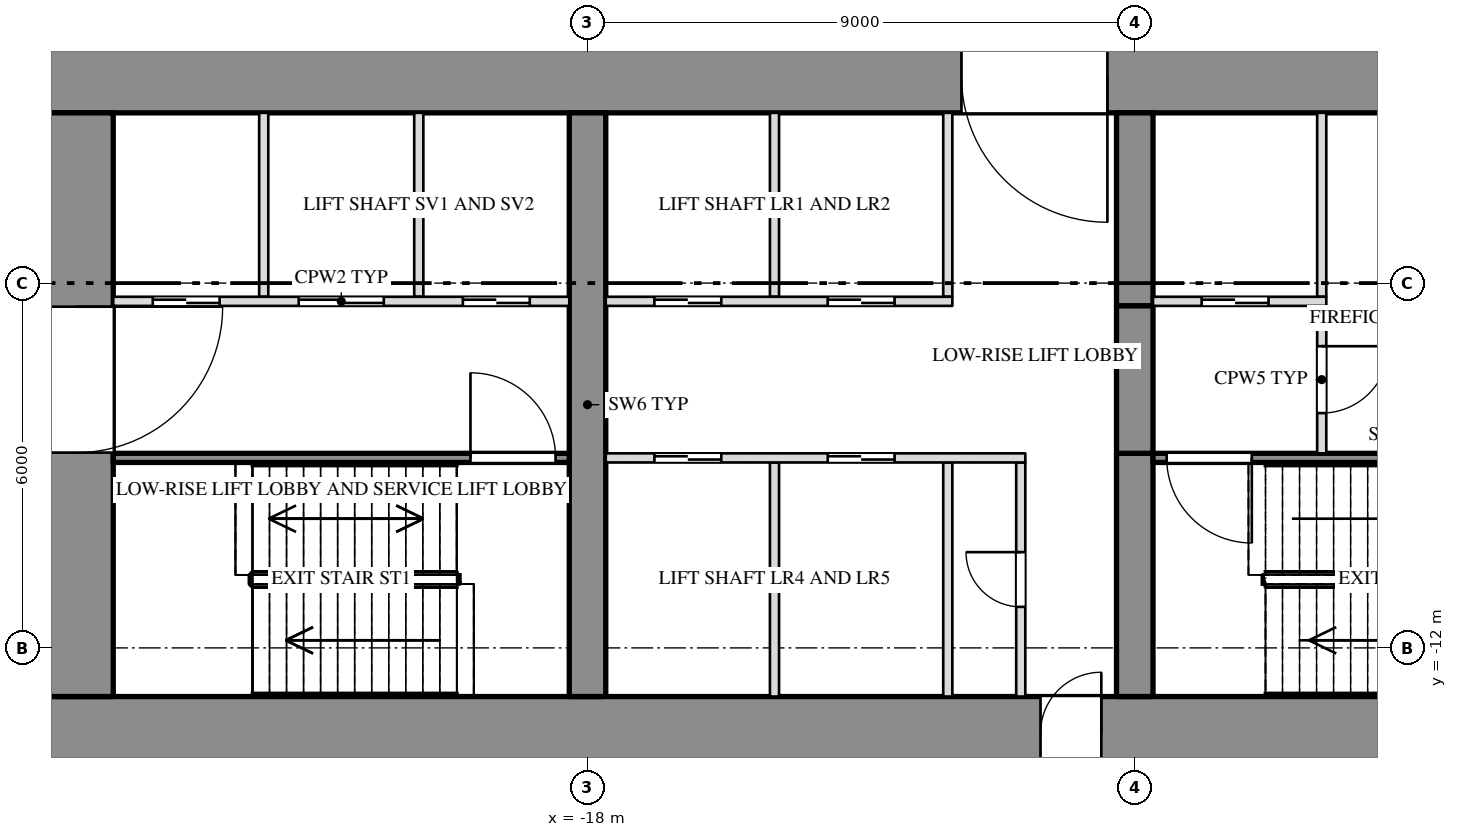
"""IFC4 building model, lengths in metres.
Left out: names, types, materials, properties, quantities, classifications, styles, units other than length and angle.
Written with IfcOpenShell. Run it as: python <this file> out.ifc"""

import sys

from ifc_helpers import new_model, si_unit, direction, frame, frame_2d, origin, place, context, subcontext, project, spatial, rectangle, extrude, element, fill, save


model = new_model("IFC4")
c1 = context("Model", 3, precision=1e-05, world=origin(), true_north=direction((0.0, 1.0)))
c2 = subcontext(c1, "Body", "Model", "MODEL_VIEW")
j1 = project(units=[si_unit("LENGTHUNIT", "METRE"), si_unit("PLANEANGLEUNIT", "RADIAN")], contexts=[c1])
p1 = place(None, origin())
s1 = spatial("IfcSite", under=j1, at=p1, CompositionType="ELEMENT")
p2 = place(p1, origin())
s2 = spatial("IfcBuilding", under=s1, at=p2, CompositionType="ELEMENT")
p3 = place(p2, frame((0.0, 0.0, 39.0)))
s3 = spatial("IfcBuildingStorey", under=s2, at=p3, CompositionType="ELEMENT", Elevation=39.0)
p4 = place(p3, frame((-27.0, -2.6, 0.0), z_axis=(0.0, 0.0, 1.0), x_axis=(1.0, 0.0, 0.0)))
e1 = element("IfcWall", 1, at=p4, inside=s3, PredefinedType="SHEAR", context=c2, shape_type="SweptSolid", body=[
    extrude(rectangle(XDim=54.0, YDim=1.2, at=frame_2d((27.0, 0.0))), origin(), (0.0, 0.0, 1.0), 4.25),
])
p5 = place(p4, frame((15.15, 0.0, 0.0)))
e2 = element("IfcOpeningElement", 2, at=p5, cuts=e1, PredefinedType="OPENING", context=c2, shape_type="SweptSolid", body=[
    extrude(rectangle(XDim=2.4, YDim=2.1, at=frame_2d((1.2, 1.05))), frame((0.0, 0.612, 0.0), z_axis=(0.0, -1.0, 0.0), x_axis=(1.0, 0.0, 0.0)), (0.0, 0.0, 1.0), 1.224),
])
p6 = place(p4, frame((36.45, 0.0, 0.0)))
e3 = element("IfcOpeningElement", 3, at=p6, cuts=e1, PredefinedType="OPENING", context=c2, shape_type="SweptSolid", body=[
    extrude(rectangle(XDim=2.4, YDim=2.1, at=frame_2d((1.2, 1.05))), frame((0.0, 0.612, 0.0), z_axis=(0.0, -1.0, 0.0), x_axis=(1.0, 0.0, 0.0)), (0.0, 0.0, 1.0), 1.224),
])
p7 = place(p3, frame((-27.0, -13.4, 0.0), z_axis=(0.0, 0.0, 1.0), x_axis=(1.0, 0.0, 0.0)))
e4 = element("IfcWall", 4, at=p7, inside=s3, PredefinedType="SHEAR", context=c2, shape_type="SweptSolid", body=[
    extrude(rectangle(XDim=54.0, YDim=1.2, at=frame_2d((27.0, 0.0))), origin(), (0.0, 0.0, 1.0), 4.25),
])
p8 = place(p7, frame((16.45, 0.0, 0.0)))
e5 = element("IfcOpeningElement", 5, at=p8, cuts=e4, PredefinedType="OPENING", context=c2, shape_type="SweptSolid", body=[
    extrude(rectangle(XDim=1.0, YDim=2.1, at=frame_2d((0.5, 1.05))), frame((0.0, 0.612, 0.0), z_axis=(0.0, -1.0, 0.0), x_axis=(1.0, 0.0, 0.0)), (0.0, 0.0, 1.0), 1.224),
])
p9 = place(p7, frame((36.55, 0.0, 0.0)))
e6 = element("IfcOpeningElement", 6, at=p9, cuts=e4, PredefinedType="OPENING", context=c2, shape_type="SweptSolid", body=[
    extrude(rectangle(XDim=1.0, YDim=2.1, at=frame_2d((0.5, 1.05))), frame((0.0, 0.612, 0.0), z_axis=(0.0, -1.0, 0.0), x_axis=(1.0, 0.0, 0.0)), (0.0, 0.0, 1.0), 1.224),
])
p10 = place(p3, frame((-26.4, -12.8, 0.0), z_axis=(0.0, 0.0, 1.0), x_axis=(0.0, 1.0, 0.0)))
e7 = element("IfcWall", 7, at=p10, inside=s3, PredefinedType="SHEAR", context=c2, shape_type="SweptSolid", body=[
    extrude(rectangle(XDim=9.6, YDim=1.2, at=frame_2d((4.8, 0.0))), origin(), (0.0, 0.0, 1.0), 4.25),
])
p11 = place(p10, frame((4.012, 0.0, 0.0)))
e8 = element("IfcOpeningElement", 8, at=p11, cuts=e7, PredefinedType="OPENING", context=c2, shape_type="SweptSolid", body=[
    extrude(rectangle(XDim=2.4, YDim=2.1, at=frame_2d((1.2, 1.05))), frame((0.0, 0.612, 0.0), z_axis=(0.0, -1.0, 0.0), x_axis=(1.0, 0.0, 0.0)), (0.0, 0.0, 1.0), 1.224),
])
p12 = place(p3, frame((-18.0, -12.8, 0.0), z_axis=(0.0, 0.0, 1.0), x_axis=(0.0, 1.0, 0.0)))
e9 = element("IfcWall", 9, at=p12, inside=s3, PredefinedType="SHEAR", context=c2, shape_type="SweptSolid", body=[
    extrude(rectangle(XDim=9.6, YDim=0.6, at=frame_2d((4.8, 0.0))), origin(), (0.0, 0.0, 1.0), 4.25),
])
p13 = place(p3, frame((-9.0, -12.8, 0.0), z_axis=(0.0, 0.0, 1.0), x_axis=(0.0, 1.0, 0.0)))
e10 = element("IfcWall", 10, at=p13, inside=s3, PredefinedType="SHEAR", context=c2, shape_type="SweptSolid", body=[
    extrude(rectangle(XDim=4.0, YDim=0.6, at=frame_2d((2.0, 0.0))), origin(), (0.0, 0.0, 1.0), 4.25),
])
p14 = place(p3, frame((-9.0, -6.375, 0.0), z_axis=(0.0, 0.0, 1.0), x_axis=(0.0, 1.0, 0.0)))
e11 = element("IfcWall", 11, at=p14, inside=s3, PredefinedType="SHEAR", context=c2, shape_type="SweptSolid", body=[
    extrude(rectangle(XDim=3.175, YDim=0.6, at=frame_2d((1.587, 0.0))), origin(), (0.0, 0.0, 1.0), 4.25),
])
p15 = place(p3, frame((-9.0, -8.8, 3.6), z_axis=(0.0, 0.0, 1.0), x_axis=(0.0, 1.0, 0.0)))
e12 = element("IfcWall", 12, at=p15, inside=s3, PredefinedType="SHEAR", context=c2, shape_type="SweptSolid", body=[
    extrude(rectangle(XDim=2.425, YDim=0.6, at=frame_2d((1.212, 0.0))), origin(), (0.0, 0.0, 1.0), 0.65),
])
for number, where, z_axis, x_axis in (
    (13, (-20.775, -6.225, 0.0), (0.0, 0.0, 1.0), (0.0, 1.0, 0.0)),
    (14, (-23.325, -6.225, 0.0), (0.0, 0.0, 1.0), (0.0, 1.0, 0.0)),
    (15, (-12.075, -6.225, 0.0), (0.0, 0.0, 1.0), (0.0, 1.0, 0.0)),
    (16, (-14.925, -6.225, 0.0), (0.0, 0.0, 1.0), (0.0, 1.0, 0.0)),
    (17, (-5.925, -6.225, 0.0), (0.0, 0.0, 1.0), (0.0, 1.0, 0.0)),
):
    element("IfcWall", number, at=place(p3, frame(where, z_axis=z_axis, x_axis=x_axis)), inside=s3, PredefinedType="PARTITIONING", context=c2, shape_type="SweptSolid", body=[
        extrude(rectangle(XDim=3.025, YDim=0.15, at=frame_2d((1.513, 0.0))), origin(), (0.0, 0.0, 1.0), 4.25),
    ])
p16 = place(p3, frame((-10.875, -12.8, 0.0), z_axis=(0.0, 0.0, 1.0), x_axis=(0.0, 1.0, 0.0)))
e18 = element("IfcWall", 18, at=p16, inside=s3, PredefinedType="PARTITIONING", context=c2, shape_type="SweptSolid", body=[
    extrude(rectangle(XDim=3.85, YDim=0.15, at=frame_2d((1.925, 0.0))), origin(), (0.0, 0.0, 1.0), 4.25),
])
p17 = place(p16, frame((1.475, 0.0, 0.0)))
e19 = element("IfcOpeningElement", 19, at=p17, cuts=e18, PredefinedType="OPENING", context=c2, shape_type="SweptSolid", body=[
    extrude(rectangle(XDim=0.9, YDim=2.1, at=frame_2d((0.45, 1.05))), frame((0.0, 0.087, 0.0), z_axis=(0.0, -1.0, 0.0), x_axis=(1.0, 0.0, 0.0)), (0.0, 0.0, 1.0), 0.174),
])
for number, where, z_axis, x_axis in (
    (20, (-12.075, -12.8, 0.0), (0.0, 0.0, 1.0), (0.0, 1.0, 0.0)),
    (21, (-14.925, -12.8, 0.0), (0.0, 0.0, 1.0), (0.0, 1.0, 0.0)),
):
    element("IfcWall", number, at=place(p3, frame(where, z_axis=z_axis, x_axis=x_axis)), inside=s3, PredefinedType="PARTITIONING", context=c2, shape_type="SweptSolid", body=[
        extrude(rectangle(XDim=3.85, YDim=0.15, at=frame_2d((1.925, 0.0))), origin(), (0.0, 0.0, 1.0), 4.25),
    ])
p18 = place(p3, frame((-5.925, -8.8, 0.0), z_axis=(0.0, 0.0, 1.0), x_axis=(0.0, 1.0, 0.0)))
e22 = element("IfcWall", 22, at=p18, inside=s3, PredefinedType="PARTITIONING", context=c2, shape_type="SweptSolid", body=[
    extrude(rectangle(XDim=2.425, YDim=0.15, at=frame_2d((1.212, 0.0))), origin(), (0.0, 0.0, 1.0), 4.25),
])
p19 = place(p18, frame((0.662, 0.0, 0.0)))
e23 = element("IfcOpeningElement", 23, at=p19, cuts=e22, PredefinedType="OPENING", context=c2, shape_type="SweptSolid", body=[
    extrude(rectangle(XDim=1.1, YDim=2.1, at=frame_2d((0.55, 1.05))), frame((0.0, 0.087, 0.0), z_axis=(0.0, -1.0, 0.0), x_axis=(1.0, 0.0, 0.0)), (0.0, 0.0, 1.0), 0.174),
])
p20 = place(p3, frame((-25.8, -6.3, 0.0), z_axis=(0.0, 0.0, 1.0), x_axis=(1.0, 0.0, 0.0)))
e24 = element("IfcWall", 24, at=p20, inside=s3, PredefinedType="PARTITIONING", context=c2, shape_type="SweptSolid", body=[
    extrude(rectangle(XDim=7.5, YDim=0.15, at=frame_2d((3.75, 0.0))), origin(), (0.0, 0.0, 1.0), 4.25),
])
p21 = place(p20, frame((0.65, 0.0, 0.0)))
e25 = element("IfcOpeningElement", 25, at=p21, cuts=e24, PredefinedType="OPENING", context=c2, shape_type="SweptSolid", body=[
    extrude(rectangle(XDim=1.1, YDim=2.1, at=frame_2d((0.55, 1.05))), frame((0.0, 0.087, 0.0), z_axis=(0.0, -1.0, 0.0), x_axis=(1.0, 0.0, 0.0)), (0.0, 0.0, 1.0), 0.174),
])
p22 = place(p20, frame((3.05, 0.0, 0.0)))
e26 = element("IfcOpeningElement", 26, at=p22, cuts=e24, PredefinedType="OPENING", context=c2, shape_type="SweptSolid", body=[
    extrude(rectangle(XDim=1.4, YDim=2.1, at=frame_2d((0.7, 1.05))), frame((0.0, 0.087, 0.0), z_axis=(0.0, -1.0, 0.0), x_axis=(1.0, 0.0, 0.0)), (0.0, 0.0, 1.0), 0.174),
])
p23 = place(p20, frame((5.75, 0.0, 0.0)))
e27 = element("IfcOpeningElement", 27, at=p23, cuts=e24, PredefinedType="OPENING", context=c2, shape_type="SweptSolid", body=[
    extrude(rectangle(XDim=1.1, YDim=2.1, at=frame_2d((0.55, 1.05))), frame((0.0, 0.087, 0.0), z_axis=(0.0, -1.0, 0.0), x_axis=(1.0, 0.0, 0.0)), (0.0, 0.0, 1.0), 0.174),
])
p24 = place(p3, frame((-17.7, -6.3, 0.0), z_axis=(0.0, 0.0, 1.0), x_axis=(1.0, 0.0, 0.0)))
e28 = element("IfcWall", 28, at=p24, inside=s3, PredefinedType="PARTITIONING", context=c2, shape_type="SweptSolid", body=[
    extrude(rectangle(XDim=5.7, YDim=0.15, at=frame_2d((2.85, 0.0))), origin(), (0.0, 0.0, 1.0), 4.25),
])
p25 = place(p24, frame((0.8, 0.0, 0.0)))
e29 = element("IfcOpeningElement", 29, at=p25, cuts=e28, PredefinedType="OPENING", context=c2, shape_type="SweptSolid", body=[
    extrude(rectangle(XDim=1.1, YDim=2.1, at=frame_2d((0.55, 1.05))), frame((0.0, 0.087, 0.0), z_axis=(0.0, -1.0, 0.0), x_axis=(1.0, 0.0, 0.0)), (0.0, 0.0, 1.0), 0.174),
])
p26 = place(p24, frame((3.65, 0.0, 0.0)))
e30 = element("IfcOpeningElement", 30, at=p26, cuts=e28, PredefinedType="OPENING", context=c2, shape_type="SweptSolid", body=[
    extrude(rectangle(XDim=1.1, YDim=2.1, at=frame_2d((0.55, 1.05))), frame((0.0, 0.087, 0.0), z_axis=(0.0, -1.0, 0.0), x_axis=(1.0, 0.0, 0.0)), (0.0, 0.0, 1.0), 0.174),
])
p27 = place(p3, frame((-8.7, -6.3, 0.0), z_axis=(0.0, 0.0, 1.0), x_axis=(1.0, 0.0, 0.0)))
e31 = element("IfcWall", 31, at=p27, inside=s3, PredefinedType="PARTITIONING", context=c2, shape_type="SweptSolid", body=[
    extrude(rectangle(XDim=2.85, YDim=0.15, at=frame_2d((1.425, 0.0))), origin(), (0.0, 0.0, 1.0), 4.25),
])
p28 = place(p27, frame((0.8, 0.0, 0.0)))
e32 = element("IfcOpeningElement", 32, at=p28, cuts=e31, PredefinedType="OPENING", context=c2, shape_type="SweptSolid", body=[
    extrude(rectangle(XDim=1.1, YDim=2.1, at=frame_2d((0.55, 1.05))), frame((0.0, 0.087, 0.0), z_axis=(0.0, -1.0, 0.0), x_axis=(1.0, 0.0, 0.0)), (0.0, 0.0, 1.0), 0.174),
])
p29 = place(p3, frame((-25.8, -8.875, 0.0), z_axis=(0.0, 0.0, 1.0), x_axis=(1.0, 0.0, 0.0)))
e33 = element("IfcWall", 33, at=p29, inside=s3, PredefinedType="SHEAR", context=c2, shape_type="SweptSolid", body=[
    extrude(rectangle(XDim=7.5, YDim=0.15, at=frame_2d((3.75, 0.0))), origin(), (0.0, 0.0, 1.0), 4.25),
])
p30 = place(p29, frame((5.875, 0.0, 0.0)))
e34 = element("IfcOpeningElement", 34, at=p30, cuts=e33, PredefinedType="OPENING", context=c2, shape_type="SweptSolid", body=[
    extrude(rectangle(XDim=1.4, YDim=2.1, at=frame_2d((0.7, 1.05))), frame((0.0, 0.087, 0.0), z_axis=(0.0, -1.0, 0.0), x_axis=(1.0, 0.0, 0.0)), (0.0, 0.0, 1.0), 0.174),
])
p31 = place(p3, frame((-17.7, -8.875, 0.0), z_axis=(0.0, 0.0, 1.0), x_axis=(1.0, 0.0, 0.0)))
e35 = element("IfcWall", 35, at=p31, inside=s3, PredefinedType="PARTITIONING", context=c2, shape_type="SweptSolid", body=[
    extrude(rectangle(XDim=6.9, YDim=0.15, at=frame_2d((3.45, 0.0))), origin(), (0.0, 0.0, 1.0), 4.25),
])
p32 = place(p31, frame((0.8, 0.0, 0.0)))
e36 = element("IfcOpeningElement", 36, at=p32, cuts=e35, PredefinedType="OPENING", context=c2, shape_type="SweptSolid", body=[
    extrude(rectangle(XDim=1.1, YDim=2.1, at=frame_2d((0.55, 1.05))), frame((0.0, 0.087, 0.0), z_axis=(0.0, -1.0, 0.0), x_axis=(1.0, 0.0, 0.0)), (0.0, 0.0, 1.0), 0.174),
])
p33 = place(p31, frame((3.65, 0.0, 0.0)))
e37 = element("IfcOpeningElement", 37, at=p33, cuts=e35, PredefinedType="OPENING", context=c2, shape_type="SweptSolid", body=[
    extrude(rectangle(XDim=1.1, YDim=2.1, at=frame_2d((0.55, 1.05))), frame((0.0, 0.087, 0.0), z_axis=(0.0, -1.0, 0.0), x_axis=(1.0, 0.0, 0.0)), (0.0, 0.0, 1.0), 0.174),
])
p34 = place(p3, frame((-8.7, -8.875, 0.0), z_axis=(0.0, 0.0, 1.0), x_axis=(1.0, 0.0, 0.0)))
e38 = element("IfcWall", 38, at=p34, inside=s3, PredefinedType="SHEAR", context=c2, shape_type="SweptSolid", body=[
    extrude(rectangle(XDim=8.4, YDim=0.15, at=frame_2d((4.2, 0.0))), origin(), (0.0, 0.0, 1.0), 4.25),
])
p35 = place(p34, frame((0.225, 0.0, 0.0)))
e39 = element("IfcOpeningElement", 39, at=p35, cuts=e38, PredefinedType="OPENING", context=c2, shape_type="SweptSolid", body=[
    extrude(rectangle(XDim=1.4, YDim=2.1, at=frame_2d((0.7, 1.05))), frame((0.0, 0.087, 0.0), z_axis=(0.0, -1.0, 0.0), x_axis=(1.0, 0.0, 0.0)), (0.0, 0.0, 1.0), 0.174),
])
p36 = place(p11, origin())
e40 = element("IfcDoor", 40, at=p36, inside=s3, OperationType="DOUBLE_DOOR_SINGLE_SWING", PredefinedType="DOOR", context=c2, shape_type="SweptSolid", body=[
    extrude(rectangle(XDim=2.4, YDim=2.1, at=frame_2d((1.2, 1.05))), frame((0.0, 0.025, 0.0), z_axis=(0.0, -1.0, 0.0), x_axis=(1.0, 0.0, 0.0)), (0.0, 0.0, 1.0), 0.05),
])
fill(e8, e40)
p37 = place(p21, origin())
e41 = element("IfcDoor", 41, at=p37, inside=s3, OperationType="SLIDING_TO_RIGHT", PredefinedType="DOOR", context=c2, shape_type="SweptSolid", body=[
    extrude(rectangle(XDim=1.1, YDim=2.1, at=frame_2d((0.55, 1.05))), frame((0.0, 0.025, 0.0), z_axis=(0.0, -1.0, 0.0), x_axis=(1.0, 0.0, 0.0)), (0.0, 0.0, 1.0), 0.05),
])
fill(e25, e41)
p38 = place(p22, origin())
e42 = element("IfcDoor", 42, at=p38, inside=s3, OperationType="SLIDING_TO_LEFT", PredefinedType="DOOR", context=c2, shape_type="SweptSolid", body=[
    extrude(rectangle(XDim=1.4, YDim=2.1, at=frame_2d((0.7, 1.05))), frame((0.0, 0.025, 0.0), z_axis=(0.0, -1.0, 0.0), x_axis=(1.0, 0.0, 0.0)), (0.0, 0.0, 1.0), 0.05),
])
fill(e26, e42)
p39 = place(p23, origin())
e43 = element("IfcDoor", 43, at=p39, inside=s3, OperationType="SLIDING_TO_RIGHT", PredefinedType="DOOR", context=c2, shape_type="SweptSolid", body=[
    extrude(rectangle(XDim=1.1, YDim=2.1, at=frame_2d((0.55, 1.05))), frame((0.0, 0.025, 0.0), z_axis=(0.0, -1.0, 0.0), x_axis=(1.0, 0.0, 0.0)), (0.0, 0.0, 1.0), 0.05),
])
fill(e27, e43)
p40 = place(p30, origin())
e44 = element("IfcDoor", 44, at=p40, inside=s3, OperationType="DOUBLE_DOOR_SINGLE_SWING", PredefinedType="DOOR", context=c2, shape_type="SweptSolid", body=[
    extrude(rectangle(XDim=1.4, YDim=2.1, at=frame_2d((0.7, 1.05))), frame((0.0, 0.025, 0.0), z_axis=(0.0, -1.0, 0.0), x_axis=(1.0, 0.0, 0.0)), (0.0, 0.0, 1.0), 0.05),
])
fill(e34, e44)
p41 = place(p32, origin())
e45 = element("IfcDoor", 45, at=p41, inside=s3, OperationType="SLIDING_TO_RIGHT", PredefinedType="DOOR", context=c2, shape_type="SweptSolid", body=[
    extrude(rectangle(XDim=1.1, YDim=2.1, at=frame_2d((0.55, 1.05))), frame((0.0, 0.025, 0.0), z_axis=(0.0, -1.0, 0.0), x_axis=(1.0, 0.0, 0.0)), (0.0, 0.0, 1.0), 0.05),
])
fill(e36, e45)
p42 = place(p25, origin())
e46 = element("IfcDoor", 46, at=p42, inside=s3, OperationType="SLIDING_TO_LEFT", PredefinedType="DOOR", context=c2, shape_type="SweptSolid", body=[
    extrude(rectangle(XDim=1.1, YDim=2.1, at=frame_2d((0.55, 1.05))), frame((0.0, 0.025, 0.0), z_axis=(0.0, -1.0, 0.0), x_axis=(1.0, 0.0, 0.0)), (0.0, 0.0, 1.0), 0.05),
])
fill(e29, e46)
p43 = place(p33, origin())
e47 = element("IfcDoor", 47, at=p43, inside=s3, OperationType="SLIDING_TO_RIGHT", PredefinedType="DOOR", context=c2, shape_type="SweptSolid", body=[
    extrude(rectangle(XDim=1.1, YDim=2.1, at=frame_2d((0.55, 1.05))), frame((0.0, 0.025, 0.0), z_axis=(0.0, -1.0, 0.0), x_axis=(1.0, 0.0, 0.0)), (0.0, 0.0, 1.0), 0.05),
])
fill(e37, e47)
p44 = place(p26, origin())
e48 = element("IfcDoor", 48, at=p44, inside=s3, OperationType="SLIDING_TO_LEFT", PredefinedType="DOOR", context=c2, shape_type="SweptSolid", body=[
    extrude(rectangle(XDim=1.1, YDim=2.1, at=frame_2d((0.55, 1.05))), frame((0.0, 0.025, 0.0), z_axis=(0.0, -1.0, 0.0), x_axis=(1.0, 0.0, 0.0)), (0.0, 0.0, 1.0), 0.05),
])
fill(e30, e48)
p45 = place(p17, origin())
e49 = element("IfcDoor", 49, at=p45, inside=s3, OperationType="SINGLE_SWING_RIGHT", PredefinedType="DOOR", context=c2, shape_type="SweptSolid", body=[
    extrude(rectangle(XDim=0.9, YDim=2.1, at=frame_2d((0.45, 1.05))), frame((0.0, 0.025, 0.0), z_axis=(0.0, -1.0, 0.0), x_axis=(1.0, 0.0, 0.0)), (0.0, 0.0, 1.0), 0.05),
])
fill(e19, e49)
p46 = place(p5, origin())
e50 = element("IfcDoor", 50, at=p46, inside=s3, OperationType="DOUBLE_DOOR_SINGLE_SWING", PredefinedType="DOOR", context=c2, shape_type="SweptSolid", body=[
    extrude(rectangle(XDim=2.4, YDim=2.1, at=frame_2d((1.2, 1.05))), frame((0.0, 0.025, 0.0), z_axis=(0.0, -1.0, 0.0), x_axis=(1.0, 0.0, 0.0)), (0.0, 0.0, 1.0), 0.05),
])
fill(e2, e50)
p47 = place(p8, origin())
e51 = element("IfcDoor", 51, at=p47, inside=s3, OperationType="SINGLE_SWING_RIGHT", PredefinedType="DOOR", context=c2, shape_type="SweptSolid", body=[
    extrude(rectangle(XDim=1.0, YDim=2.1, at=frame_2d((0.5, 1.05))), frame((0.0, 0.025, 0.0), z_axis=(0.0, -1.0, 0.0), x_axis=(1.0, 0.0, 0.0)), (0.0, 0.0, 1.0), 0.05),
])
fill(e5, e51)
p48 = place(p35, origin())
e52 = element("IfcDoor", 52, at=p48, inside=s3, OperationType="DOUBLE_DOOR_SINGLE_SWING", PredefinedType="DOOR", context=c2, shape_type="SweptSolid", body=[
    extrude(rectangle(XDim=1.4, YDim=2.1, at=frame_2d((0.7, 1.05))), frame((0.0, 0.025, 0.0), z_axis=(0.0, -1.0, 0.0), x_axis=(1.0, 0.0, 0.0)), (0.0, 0.0, 1.0), 0.05),
])
fill(e39, e52)
p49 = place(p28, origin())
e53 = element("IfcDoor", 53, at=p49, inside=s3, OperationType="SLIDING_TO_RIGHT", PredefinedType="DOOR", context=c2, shape_type="SweptSolid", body=[
    extrude(rectangle(XDim=1.1, YDim=2.1, at=frame_2d((0.55, 1.05))), frame((0.0, 0.025, 0.0), z_axis=(0.0, -1.0, 0.0), x_axis=(1.0, 0.0, 0.0)), (0.0, 0.0, 1.0), 0.05),
])
fill(e32, e53)
p50 = place(p19, origin())
e54 = element("IfcDoor", 54, at=p50, inside=s3, OperationType="SINGLE_SWING_LEFT", PredefinedType="DOOR", context=c2, shape_type="SweptSolid", body=[
    extrude(rectangle(XDim=1.1, YDim=2.1, at=frame_2d((0.55, 1.05))), frame((0.0, 0.025, 0.0), z_axis=(0.0, -1.0, 0.0), x_axis=(1.0, 0.0, 0.0)), (0.0, 0.0, 1.0), 0.05),
])
fill(e23, e54)
save(model, sys.argv[1])
